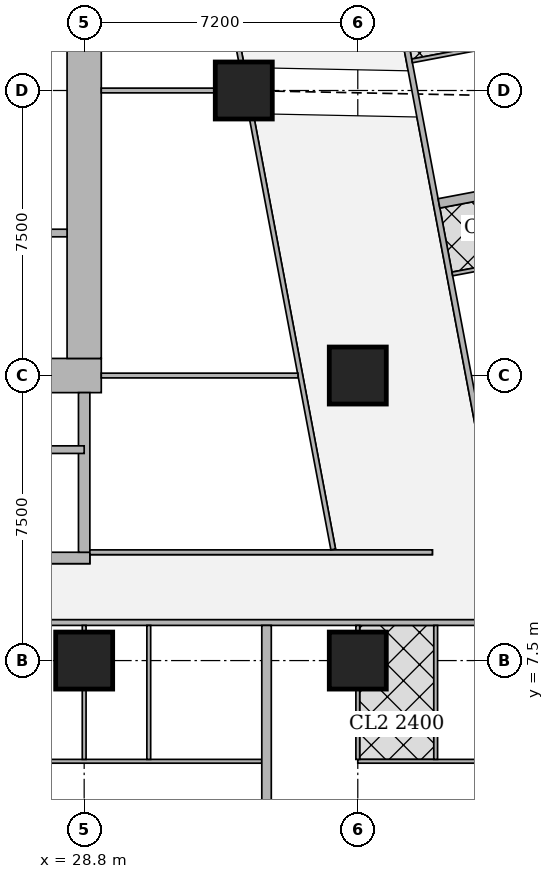
"""IFC4 building model, lengths in metres.
Left out: names, types, materials, properties, quantities, classifications, styles, units other than length and angle.
Written with IfcOpenShell. Run it as: python <this file> out.ifc"""

import sys

from ifc_helpers import new_model, si_unit, direction, frame, frame_2d, origin, origin_2d, place, context, subcontext, project, spatial, rectangle, extrude, element, fill, save


model = new_model("IFC4")
c1 = context("Model", 3, precision=1e-05, world=origin(), true_north=direction((0.0, 1.0)))
c2 = subcontext(c1, "Body", "Model", "MODEL_VIEW")
j1 = project(units=[si_unit("LENGTHUNIT", "METRE"), si_unit("PLANEANGLEUNIT", "RADIAN")], contexts=[c1])
p1 = place(None, origin())
s1 = spatial("IfcSite", under=j1, at=p1, CompositionType="ELEMENT")
p2 = place(p1, origin())
s2 = spatial("IfcBuilding", under=s1, at=p2, CompositionType="ELEMENT")
p3 = place(p2, frame((0.0, 0.0, 158.3)))
s3 = spatial("IfcBuildingStorey", under=s2, at=p3, CompositionType="ELEMENT", Elevation=158.3)
for number, where, z_axis, x_axis in (
    (1, (28.8, 7.5, 0.0), (0.0, 0.0, 1.0), (1.0, 0.0, 0.0)),
    (2, (36.0, 7.5, 0.0), (0.0, 0.0, 1.0), (1.0, 0.0, 0.0)),
    (3, (36.0, 15.0, 0.0), (0.0, 0.0, 1.0), (1.0, 0.0, 0.0)),
    (4, (33.0, 22.5, 0.0), (0.0, 0.0, 1.0), (1.0, 0.0, 0.0)),
):
    element("IfcColumn", number, at=place(p3, frame(where, z_axis=z_axis, x_axis=x_axis)), inside=s3, PredefinedType="COLUMN", context=c2, shape_type="SweptSolid", body=[
        extrude(rectangle(XDim=1.5, YDim=1.5, at=origin_2d()), origin(), (0.0, 0.0, 1.0), 3.75),
    ])
p4 = place(p3, frame((13.95, 15.0, 0.0), z_axis=(0.0, 0.0, 1.0), x_axis=(1.0, 0.0, 0.0)))
e5 = element("IfcWall", 5, at=p4, inside=s3, PredefinedType="SHEAR", context=c2, shape_type="SweptSolid", body=[
    extrude(rectangle(XDim=15.3, YDim=0.9, at=frame_2d((7.65, 0.0))), origin(), (0.0, 0.0, 1.0), 3.75),
])
p5 = place(p4, frame((4.45, 0.0, 0.0)))
e6 = element("IfcOpeningElement", 6, at=p5, cuts=e5, PredefinedType="OPENING", context=c2, shape_type="SweptSolid", body=[
    extrude(rectangle(XDim=1.8, YDim=2.1, at=frame_2d((0.9, 1.05))), frame((0.0, 0.46, 0.0), z_axis=(0.0, -1.0, 0.0), x_axis=(1.0, 0.0, 0.0)), (0.0, 0.0, 1.0), 0.92),
])
p6 = place(p4, frame((10.7, 0.0, 0.0)))
e7 = element("IfcOpeningElement", 7, at=p6, cuts=e5, PredefinedType="OPENING", context=c2, shape_type="SweptSolid", body=[
    extrude(rectangle(XDim=1.1, YDim=2.1, at=frame_2d((0.55, 1.05))), frame((0.0, 0.46, 0.0), z_axis=(0.0, -1.0, 0.0), x_axis=(1.0, 0.0, 0.0)), (0.0, 0.0, 1.0), 0.92),
])
p7 = place(p3, frame((28.8, 15.45, 0.0), z_axis=(0.0, 0.0, 1.0), x_axis=(0.0, 1.0, 0.0)))
e8 = element("IfcWall", 8, at=p7, inside=s3, PredefinedType="SHEAR", context=c2, shape_type="SweptSolid", body=[
    extrude(rectangle(XDim=14.1, YDim=0.9, at=frame_2d((7.05, 0.0))), origin(), (0.0, 0.0, 1.0), 3.75),
])
p8 = place(p3, frame((21.45, 10.2, 0.0), z_axis=(0.0, 0.0, 1.0), x_axis=(1.0, 0.0, 0.0)))
e9 = element("IfcWall", 9, at=p8, inside=s3, PredefinedType="SHEAR", context=c2, shape_type="SweptSolid", body=[
    extrude(rectangle(XDim=7.5, YDim=0.3, at=frame_2d((3.75, 0.0))), origin(), (0.0, 0.0, 1.0), 3.75),
])
p9 = place(p8, frame((0.5, 0.0, 0.0)))
e10 = element("IfcOpeningElement", 10, at=p9, cuts=e9, PredefinedType="OPENING", context=c2, shape_type="SweptSolid", body=[
    extrude(rectangle(XDim=1.1, YDim=2.1, at=frame_2d((0.55, 1.05))), frame((0.0, 0.16, 0.0), z_axis=(0.0, -1.0, 0.0), x_axis=(1.0, 0.0, 0.0)), (0.0, 0.0, 1.0), 0.32),
])
p10 = place(p3, frame((28.8, 10.35, 0.0), z_axis=(0.0, 0.0, 1.0), x_axis=(0.0, 1.0, 0.0)))
e11 = element("IfcWall", 11, at=p10, inside=s3, PredefinedType="SHEAR", context=c2, shape_type="SweptSolid", body=[
    extrude(rectangle(XDim=4.2, YDim=0.3, at=frame_2d((2.1, 0.0))), origin(), (0.0, 0.0, 1.0), 3.75),
])
p11 = place(p3, frame((40.053, 8.5, 0.0), z_axis=(0.0, 0.0, 1.0), x_axis=(-1.0, 0.0, 0.0)))
e12 = element("IfcWall", 12, at=p11, inside=s3, PredefinedType="SOLIDWALL", context=c2, shape_type="SweptSolid", body=[
    extrude(rectangle(XDim=31.703, YDim=0.15, at=frame_2d((15.852, 0.0))), origin(), (0.0, 0.0, 1.0), 3.5),
])
p12 = place(p11, frame((28.103, 0.0, 0.0)))
e13 = element("IfcOpeningElement", 13, at=p12, cuts=e12, PredefinedType="OPENING", context=c2, shape_type="SweptSolid", body=[
    extrude(rectangle(XDim=1.0, YDim=2.1, at=frame_2d((0.5, 1.05))), frame((0.0, 0.085, 0.0), z_axis=(0.0, -1.0, 0.0), x_axis=(1.0, 0.0, 0.0)), (0.0, 0.0, 1.0), 0.17),
])
p13 = place(p11, frame((19.754, 0.0, 0.0)))
e14 = element("IfcOpeningElement", 14, at=p13, cuts=e12, PredefinedType="OPENING", context=c2, shape_type="SweptSolid", body=[
    extrude(rectangle(XDim=1.0, YDim=2.1, at=frame_2d((0.5, 1.05))), frame((0.0, 0.085, 0.0), z_axis=(0.0, -1.0, 0.0), x_axis=(1.0, 0.0, 0.0)), (0.0, 0.0, 1.0), 0.17),
])
p14 = place(p11, frame((5.354, 0.0, 0.0)))
e15 = element("IfcOpeningElement", 15, at=p14, cuts=e12, PredefinedType="OPENING", context=c2, shape_type="SweptSolid", body=[
    extrude(rectangle(XDim=1.0, YDim=2.1, at=frame_2d((0.5, 1.05))), frame((0.0, 0.085, 0.0), z_axis=(0.0, -1.0, 0.0), x_axis=(1.0, 0.0, 0.0)), (0.0, 0.0, 1.0), 0.17),
])
p15 = place(p3, frame((33.623, 43.022, 0.0), z_axis=(0.0, 0.0, 1.0), x_axis=(0.185596841028, -0.98262597798, 0.0)))
e16 = element("IfcWall", 16, at=p15, inside=s3, PredefinedType="SOLIDWALL", context=c2, shape_type="SweptSolid", body=[
    extrude(rectangle(XDim=41.66, YDim=0.15, at=frame_2d((20.83, 0.0))), origin(), (0.0, 0.0, 1.0), 2.5),
])
p16 = place(p15, frame((21.514, 0.0, 0.0)))
e17 = element("IfcOpeningElement", 17, at=p16, cuts=e16, PredefinedType="OPENING", context=c2, shape_type="SweptSolid", body=[
    extrude(rectangle(XDim=1.0, YDim=2.1, at=frame_2d((0.5, 1.05))), frame((0.0, 0.085, 0.0), z_axis=(0.0, -1.0, 0.0), x_axis=(1.0, 0.0, 0.0)), (0.0, 0.0, 1.0), 0.17),
])
p17 = place(p15, frame((27.062, 0.0, 0.0)))
e18 = element("IfcOpeningElement", 18, at=p17, cuts=e16, PredefinedType="OPENING", context=c2, shape_type="SweptSolid", body=[
    extrude(rectangle(XDim=1.0, YDim=2.1, at=frame_2d((0.5, 1.05))), frame((0.0, 0.085, 0.0), z_axis=(0.0, -1.0, 0.0), x_axis=(1.0, 0.0, 0.0)), (0.0, 0.0, 1.0), 0.17),
])
p18 = place(p15, frame((29.934, 0.0, 0.0)))
e19 = element("IfcOpeningElement", 19, at=p18, cuts=e16, PredefinedType="OPENING", context=c2, shape_type="SweptSolid", body=[
    extrude(rectangle(XDim=1.0, YDim=2.1, at=frame_2d((0.5, 1.05))), frame((0.0, 0.085, 0.0), z_axis=(0.0, -1.0, 0.0), x_axis=(1.0, 0.0, 0.0)), (0.0, 0.0, 1.0), 0.17),
])
p19 = place(p3, frame((33.474, 4.85, 0.0), z_axis=(0.0, 0.0, 1.0), x_axis=(-1.0, 0.0, 0.0)))
e20 = element("IfcWall", 20, at=p19, inside=s3, PredefinedType="PARTITIONING", context=c2, shape_type="SweptSolid", body=[
    extrude(rectangle(XDim=11.874, YDim=0.1, at=frame_2d((5.937, 0.0))), origin(), (0.0, 0.0, 1.0), 3.5),
])
p20 = place(p19, frame((10.399, 0.0, 0.0)))
e21 = element("IfcOpeningElement", 21, at=p20, cuts=e20, PredefinedType="OPENING", context=c2, shape_type="SweptSolid", body=[
    extrude(rectangle(XDim=0.9, YDim=2.1, at=frame_2d((0.45, 1.05))), frame((0.0, 0.06, 0.0), z_axis=(0.0, -1.0, 0.0), x_axis=(1.0, 0.0, 0.0)), (0.0, 0.0, 1.0), 0.12),
])
p21 = place(p19, frame((5.425, 0.0, 0.0)))
e22 = element("IfcOpeningElement", 22, at=p21, cuts=e20, PredefinedType="OPENING", context=c2, shape_type="SweptSolid", body=[
    extrude(rectangle(XDim=0.9, YDim=2.1, at=frame_2d((0.45, 1.05))), frame((0.0, 0.06, 0.0), z_axis=(0.0, -1.0, 0.0), x_axis=(1.0, 0.0, 0.0)), (0.0, 0.0, 1.0), 0.12),
])
p22 = place(p19, frame((3.374, 0.0, 0.0)))
e23 = element("IfcOpeningElement", 23, at=p22, cuts=e20, PredefinedType="OPENING", context=c2, shape_type="SweptSolid", body=[
    extrude(rectangle(XDim=0.9, YDim=2.1, at=frame_2d((0.45, 1.05))), frame((0.0, 0.06, 0.0), z_axis=(0.0, -1.0, 0.0), x_axis=(1.0, 0.0, 0.0)), (0.0, 0.0, 1.0), 0.12),
])
p23 = place(p19, frame((8.0, 0.0, 0.0)))
e24 = element("IfcOpeningElement", 24, at=p23, cuts=e20, PredefinedType="OPENING", context=c2, shape_type="SweptSolid", body=[
    extrude(rectangle(XDim=0.9, YDim=2.1, at=frame_2d((0.45, 1.05))), frame((0.0, 0.06, 0.0), z_axis=(0.0, -1.0, 0.0), x_axis=(1.0, 0.0, 0.0)), (0.0, 0.0, 1.0), 0.12),
])
p24 = place(p19, frame((0.975, 0.0, 0.0)))
e25 = element("IfcOpeningElement", 25, at=p24, cuts=e20, PredefinedType="OPENING", context=c2, shape_type="SweptSolid", body=[
    extrude(rectangle(XDim=0.9, YDim=2.1, at=frame_2d((0.45, 1.05))), frame((0.0, 0.06, 0.0), z_axis=(0.0, -1.0, 0.0), x_axis=(1.0, 0.0, 0.0)), (0.0, 0.0, 1.0), 0.12),
])
p25 = place(p3, frame((28.8, 4.9, 0.0), z_axis=(0.0, 0.0, 1.0), x_axis=(0.0, 1.0, 0.0)))
e26 = element("IfcWall", 26, at=p25, inside=s3, PredefinedType="PARTITIONING", context=c2, shape_type="SweptSolid", body=[
    extrude(rectangle(XDim=1.849, YDim=0.1, at=frame_2d((0.925, 0.0))), origin(), (0.0, 0.0, 1.0), 3.5),
])
p26 = place(p3, frame((28.8, 8.251, 0.0), z_axis=(0.0, 0.0, 1.0), x_axis=(0.0, 1.0, 0.0)))
e27 = element("IfcWall", 27, at=p26, inside=s3, PredefinedType="PARTITIONING", context=c2, shape_type="SweptSolid", body=[
    extrude(rectangle(XDim=0.174, YDim=0.1, at=frame_2d((0.087, 0.0))), origin(), (0.0, 0.0, 1.0), 3.5),
])
p27 = place(p3, frame((30.5, 4.9, 0.0), z_axis=(0.0, 0.0, 1.0), x_axis=(0.0, 1.0, 0.0)))
e28 = element("IfcWall", 28, at=p27, inside=s3, PredefinedType="PARTITIONING", context=c2, shape_type="SweptSolid", body=[
    extrude(rectangle(XDim=3.525, YDim=0.1, at=frame_2d((1.763, 0.0))), origin(), (0.0, 0.0, 1.0), 3.5),
])
p28 = place(p3, frame((40.747, 4.85, 0.0), z_axis=(0.0, 0.0, 1.0), x_axis=(-1.0, 0.0, 0.0)))
e29 = element("IfcWall", 29, at=p28, inside=s3, PredefinedType="PARTITIONING", context=c2, shape_type="SweptSolid", body=[
    extrude(rectangle(XDim=4.747, YDim=0.1, at=frame_2d((2.374, 0.0))), origin(), (0.0, 0.0, 1.0), 3.5),
])
p29 = place(p28, frame((3.272, 0.0, 0.0)))
e30 = element("IfcOpeningElement", 30, at=p29, cuts=e29, PredefinedType="OPENING", context=c2, shape_type="SweptSolid", body=[
    extrude(rectangle(XDim=0.9, YDim=2.1, at=frame_2d((0.45, 1.05))), frame((0.0, 0.06, 0.0), z_axis=(0.0, -1.0, 0.0), x_axis=(1.0, 0.0, 0.0)), (0.0, 0.0, 1.0), 0.12),
])
p30 = place(p28, frame((0.15, 0.0, 0.0)))
e31 = element("IfcOpeningElement", 31, at=p30, cuts=e29, PredefinedType="OPENING", context=c2, shape_type="SweptSolid", body=[
    extrude(rectangle(XDim=0.9, YDim=2.1, at=frame_2d((0.45, 1.05))), frame((0.0, 0.06, 0.0), z_axis=(0.0, -1.0, 0.0), x_axis=(1.0, 0.0, 0.0)), (0.0, 0.0, 1.0), 0.12),
])
p31 = place(p28, frame((1.472, 0.0, 0.0)))
e32 = element("IfcOpeningElement", 32, at=p31, cuts=e29, PredefinedType="OPENING", context=c2, shape_type="SweptSolid", body=[
    extrude(rectangle(XDim=0.9, YDim=2.1, at=frame_2d((0.45, 1.05))), frame((0.0, 0.06, 0.0), z_axis=(0.0, -1.0, 0.0), x_axis=(1.0, 0.0, 0.0)), (0.0, 0.0, 1.0), 0.12),
])
p32 = place(p3, frame((36.0, 4.9, 0.0), z_axis=(0.0, 0.0, 1.0), x_axis=(0.0, 1.0, 0.0)))
e33 = element("IfcWall", 33, at=p32, inside=s3, PredefinedType="PARTITIONING", context=c2, shape_type="SweptSolid", body=[
    extrude(rectangle(XDim=1.849, YDim=0.1, at=frame_2d((0.925, 0.0))), origin(), (0.0, 0.0, 1.0), 3.5),
])
p33 = place(p3, frame((36.0, 8.251, 0.0), z_axis=(0.0, 0.0, 1.0), x_axis=(0.0, 1.0, 0.0)))
e34 = element("IfcWall", 34, at=p33, inside=s3, PredefinedType="PARTITIONING", context=c2, shape_type="SweptSolid", body=[
    extrude(rectangle(XDim=0.174, YDim=0.1, at=frame_2d((0.087, 0.0))), origin(), (0.0, 0.0, 1.0), 3.5),
])
p34 = place(p3, frame((38.05, 4.9, 0.0), z_axis=(0.0, 0.0, 1.0), x_axis=(0.0, 1.0, 0.0)))
e35 = element("IfcWall", 35, at=p34, inside=s3, PredefinedType="PARTITIONING", context=c2, shape_type="SweptSolid", body=[
    extrude(rectangle(XDim=3.525, YDim=0.1, at=frame_2d((1.763, 0.0))), origin(), (0.0, 0.0, 1.0), 3.5),
])
p35 = place(p3, frame((33.599, 3.65, 0.0), z_axis=(0.0, 0.0, 1.0), x_axis=(0.0, 1.0, 0.0)))
e36 = element("IfcWall", 36, at=p35, inside=s3, PredefinedType="SOLIDWALL", context=c2, shape_type="SweptSolid", body=[
    extrude(rectangle(XDim=4.775, YDim=0.25, at=frame_2d((2.388, 0.0))), origin(), (0.0, 0.0, 1.0), 3.5),
])
p36 = place(p3, frame((40.942, 23.943, 0.0), z_axis=(0.0, 0.0, 1.0), x_axis=(-0.982598214409, -0.185743772548, 0.0)))
e37 = element("IfcWall", 37, at=p36, inside=s3, PredefinedType="PARTITIONING", context=c2, shape_type="SweptSolid", body=[
    extrude(rectangle(XDim=3.575, YDim=0.1, at=frame_2d((1.788, 0.0))), origin(), (0.0, 0.0, 1.0), 3.5),
])
p37 = place(p3, frame((41.952, 18.327, 0.0), z_axis=(0.0, 0.0, 1.0), x_axis=(-0.982648794755, -0.185475998897, 0.0)))
e38 = element("IfcWall", 38, at=p37, inside=s3, PredefinedType="PARTITIONING", context=c2, shape_type="SweptSolid", body=[
    extrude(rectangle(XDim=3.525, YDim=0.1, at=frame_2d((1.763, 0.0))), origin(), (0.0, 0.0, 1.0), 3.5),
])
p38 = place(p3, frame((42.829, 20.416, 0.0), z_axis=(0.0, 0.0, 1.0), x_axis=(-0.982635807605, -0.185544791394, 0.0)))
e39 = element("IfcWall", 39, at=p38, inside=s3, PredefinedType="SOLIDWALL", context=c2, shape_type="SweptSolid", body=[
    extrude(rectangle(XDim=4.775, YDim=0.25, at=frame_2d((2.388, 0.0))), origin(), (0.0, 0.0, 1.0), 3.5),
])
p39 = place(p3, frame((28.95, 10.35, 0.0), z_axis=(0.0, 0.0, 1.0), x_axis=(1.0, 0.0, 0.0)))
e40 = element("IfcWall", 40, at=p39, inside=s3, PredefinedType="PARTITIONING", context=c2, shape_type="SweptSolid", body=[
    extrude(rectangle(XDim=9.013, YDim=0.125, at=frame_2d((4.506, 0.0))), origin(), (0.0, 0.0, 1.0), 3.5),
])
p40 = place(p3, frame((35.354, 10.424, 0.0), z_axis=(0.0, 0.0, 1.0), x_axis=(-0.185612234763, 0.982623070311, 0.0)))
e41 = element("IfcWall", 41, at=p40, inside=s3, PredefinedType="PARTITIONING", context=c2, shape_type="SweptSolid", body=[
    extrude(rectangle(XDim=11.513, YDim=0.125, at=frame_2d((5.756, 0.0))), origin(), (0.0, 0.0, 1.0), 3.5),
])
p41 = place(p40, frame((0.697, 0.0, 0.0)))
e42 = element("IfcOpeningElement", 42, at=p41, cuts=e41, PredefinedType="OPENING", context=c2, shape_type="SweptSolid", body=[
    extrude(rectangle(XDim=1.0, YDim=2.1, at=frame_2d((0.5, 1.05))), frame((0.0, 0.073, 0.0), z_axis=(0.0, -1.0, 0.0), x_axis=(1.0, 0.0, 0.0)), (0.0, 0.0, 1.0), 0.145),
])
p42 = place(p40, frame((5.48, 0.0, 0.0)))
e43 = element("IfcOpeningElement", 43, at=p42, cuts=e41, PredefinedType="OPENING", context=c2, shape_type="SweptSolid", body=[
    extrude(rectangle(XDim=1.0, YDim=2.1, at=frame_2d((0.5, 1.05))), frame((0.0, 0.073, 0.0), z_axis=(0.0, -1.0, 0.0), x_axis=(1.0, 0.0, 0.0)), (0.0, 0.0, 1.0), 0.145),
])
p43 = place(p3, frame((32.929, 23.263, 0.0), z_axis=(0.0, 0.0, 1.0), x_axis=(-0.185612234763, 0.982623070311, 0.0)))
e44 = element("IfcWall", 44, at=p43, inside=s3, PredefinedType="PARTITIONING", context=c2, shape_type="SweptSolid", body=[
    extrude(rectangle(XDim=11.513, YDim=0.125, at=frame_2d((5.756, 0.0))), origin(), (0.0, 0.0, 1.0), 3.5),
])
p44 = place(p43, frame((0.15, 0.0, 0.0)))
e45 = element("IfcOpeningElement", 45, at=p44, cuts=e44, PredefinedType="OPENING", context=c2, shape_type="SweptSolid", body=[
    extrude(rectangle(XDim=1.0, YDim=2.1, at=frame_2d((0.5, 1.05))), frame((0.0, 0.073, 0.0), z_axis=(0.0, -1.0, 0.0), x_axis=(1.0, 0.0, 0.0)), (0.0, 0.0, 1.0), 0.145),
])
p45 = place(p43, frame((7.679, 0.0, 0.0)))
e46 = element("IfcOpeningElement", 46, at=p45, cuts=e44, PredefinedType="OPENING", context=c2, shape_type="SweptSolid", body=[
    extrude(rectangle(XDim=1.0, YDim=2.1, at=frame_2d((0.5, 1.05))), frame((0.0, 0.073, 0.0), z_axis=(0.0, -1.0, 0.0), x_axis=(1.0, 0.0, 0.0)), (0.0, 0.0, 1.0), 0.145),
])
p46 = place(p3, frame((29.25, 15.0, 0.0), z_axis=(0.0, 0.0, 1.0), x_axis=(1.0, 0.0, 0.0)))
e47 = element("IfcWall", 47, at=p46, inside=s3, PredefinedType="PARTITIONING", context=c2, shape_type="SweptSolid", body=[
    extrude(rectangle(XDim=5.176, YDim=0.125, at=frame_2d((2.588, 0.0))), origin(), (0.0, 0.0, 1.0), 3.5),
])
p47 = place(p3, frame((29.25, 22.5, 0.0), z_axis=(0.0, 0.0, 1.0), x_axis=(1.0, 0.0, 0.0)))
e48 = element("IfcWall", 48, at=p47, inside=s3, PredefinedType="PARTITIONING", context=c2, shape_type="SweptSolid", body=[
    extrude(rectangle(XDim=2.999, YDim=0.125, at=frame_2d((1.5, 0.0))), origin(), (0.0, 0.0, 1.0), 3.5),
])
p48 = place(p3, frame((23.0, 13.05, 0.0), z_axis=(0.0, 0.0, 1.0), x_axis=(1.0, 0.0, 0.0)))
e49 = element("IfcWall", 49, at=p48, inside=s3, PredefinedType="SHEAR", context=c2, shape_type="SweptSolid", body=[
    extrude(rectangle(XDim=5.8, YDim=0.2, at=frame_2d((2.9, 0.0))), origin(), (0.0, 0.0, 1.0), 3.75),
])
p49 = place(p3, frame((27.4, 18.75, 0.0), z_axis=(0.0, 0.0, 1.0), x_axis=(1.0, 0.0, 0.0)))
e50 = element("IfcWall", 50, at=p49, inside=s3, PredefinedType="SOLIDWALL", context=c2, shape_type="SweptSolid", body=[
    extrude(rectangle(XDim=0.95, YDim=0.2, at=frame_2d((0.475, 0.0))), origin(), (0.0, 0.0, 1.0), 3.5),
])
p50 = place(p21, origin())
e51 = element("IfcDoor", 51, at=p50, inside=s3, OperationType="SINGLE_SWING_RIGHT", PredefinedType="DOOR", context=c2, shape_type="SweptSolid", body=[
    extrude(rectangle(XDim=0.9, YDim=2.1, at=frame_2d((0.45, 1.05))), frame((0.0, 0.025, 0.0), z_axis=(0.0, -1.0, 0.0), x_axis=(1.0, 0.0, 0.0)), (0.0, 0.0, 1.0), 0.05),
])
fill(e22, e51)
p51 = place(p22, origin())
e52 = element("IfcDoor", 52, at=p51, inside=s3, OperationType="SINGLE_SWING_RIGHT", PredefinedType="DOOR", context=c2, shape_type="SweptSolid", body=[
    extrude(rectangle(XDim=0.9, YDim=2.1, at=frame_2d((0.45, 1.05))), frame((0.0, 0.025, 0.0), z_axis=(0.0, -1.0, 0.0), x_axis=(1.0, 0.0, 0.0)), (0.0, 0.0, 1.0), 0.05),
])
fill(e23, e52)
p52 = place(p24, origin())
e53 = element("IfcDoor", 53, at=p52, inside=s3, OperationType="SINGLE_SWING_RIGHT", PredefinedType="DOOR", context=c2, shape_type="SweptSolid", body=[
    extrude(rectangle(XDim=0.9, YDim=2.1, at=frame_2d((0.45, 1.05))), frame((0.0, 0.025, 0.0), z_axis=(0.0, -1.0, 0.0), x_axis=(1.0, 0.0, 0.0)), (0.0, 0.0, 1.0), 0.05),
])
fill(e25, e53)
p53 = place(p29, origin())
e54 = element("IfcDoor", 54, at=p53, inside=s3, OperationType="SINGLE_SWING_LEFT", PredefinedType="DOOR", context=c2, shape_type="SweptSolid", body=[
    extrude(rectangle(XDim=0.9, YDim=2.1, at=frame_2d((0.45, 1.05))), frame((0.0, 0.025, 0.0), z_axis=(0.0, -1.0, 0.0), x_axis=(1.0, 0.0, 0.0)), (0.0, 0.0, 1.0), 0.05),
])
fill(e30, e54)
p54 = place(p31, origin())
e55 = element("IfcDoor", 55, at=p54, inside=s3, OperationType="SINGLE_SWING_RIGHT", PredefinedType="DOOR", context=c2, shape_type="SweptSolid", body=[
    extrude(rectangle(XDim=0.9, YDim=2.1, at=frame_2d((0.45, 1.05))), frame((0.0, 0.025, 0.0), z_axis=(0.0, -1.0, 0.0), x_axis=(1.0, 0.0, 0.0)), (0.0, 0.0, 1.0), 0.05),
])
fill(e32, e55)
p55 = place(p14, origin())
e56 = element("IfcDoor", 56, at=p55, inside=s3, OperationType="SINGLE_SWING_RIGHT", PredefinedType="DOOR", context=c2, shape_type="SweptSolid", body=[
    extrude(rectangle(XDim=1.0, YDim=2.1, at=frame_2d((0.5, 1.05))), frame((0.0, 0.025, 0.0), z_axis=(0.0, -1.0, 0.0), x_axis=(1.0, 0.0, 0.0)), (0.0, 0.0, 1.0), 0.05),
])
fill(e15, e56)
p56 = place(p16, origin())
e57 = element("IfcDoor", 57, at=p56, inside=s3, OperationType="SINGLE_SWING_RIGHT", PredefinedType="DOOR", context=c2, shape_type="SweptSolid", body=[
    extrude(rectangle(XDim=1.0, YDim=2.1, at=frame_2d((0.5, 1.05))), frame((0.0, 0.025, 0.0), z_axis=(0.0, -1.0, 0.0), x_axis=(1.0, 0.0, 0.0)), (0.0, 0.0, 1.0), 0.05),
])
fill(e17, e57)
p57 = place(p17, origin())
e58 = element("IfcDoor", 58, at=p57, inside=s3, OperationType="SINGLE_SWING_LEFT", PredefinedType="DOOR", context=c2, shape_type="SweptSolid", body=[
    extrude(rectangle(XDim=1.0, YDim=2.1, at=frame_2d((0.5, 1.05))), frame((0.0, 0.025, 0.0), z_axis=(0.0, -1.0, 0.0), x_axis=(1.0, 0.0, 0.0)), (0.0, 0.0, 1.0), 0.05),
])
fill(e18, e58)
p58 = place(p41, origin())
e59 = element("IfcDoor", 59, at=p58, inside=s3, OperationType="SINGLE_SWING_LEFT", PredefinedType="DOOR", context=c2, shape_type="SweptSolid", body=[
    extrude(rectangle(XDim=1.0, YDim=2.1, at=frame_2d((0.5, 1.05))), frame((0.0, 0.025, 0.0), z_axis=(0.0, -1.0, 0.0), x_axis=(1.0, 0.0, 0.0)), (0.0, 0.0, 1.0), 0.05),
])
fill(e42, e59)
p59 = place(p42, origin())
e60 = element("IfcDoor", 60, at=p59, inside=s3, OperationType="SINGLE_SWING_LEFT", PredefinedType="DOOR", context=c2, shape_type="SweptSolid", body=[
    extrude(rectangle(XDim=1.0, YDim=2.1, at=frame_2d((0.5, 1.05))), frame((0.0, 0.025, 0.0), z_axis=(0.0, -1.0, 0.0), x_axis=(1.0, 0.0, 0.0)), (0.0, 0.0, 1.0), 0.05),
])
fill(e43, e60)
p60 = place(p44, origin())
e61 = element("IfcDoor", 61, at=p60, inside=s3, OperationType="SINGLE_SWING_LEFT", PredefinedType="DOOR", context=c2, shape_type="SweptSolid", body=[
    extrude(rectangle(XDim=1.0, YDim=2.1, at=frame_2d((0.5, 1.05))), frame((0.0, 0.025, 0.0), z_axis=(0.0, -1.0, 0.0), x_axis=(1.0, 0.0, 0.0)), (0.0, 0.0, 1.0), 0.05),
])
fill(e45, e61)
save(model, sys.argv[1])
